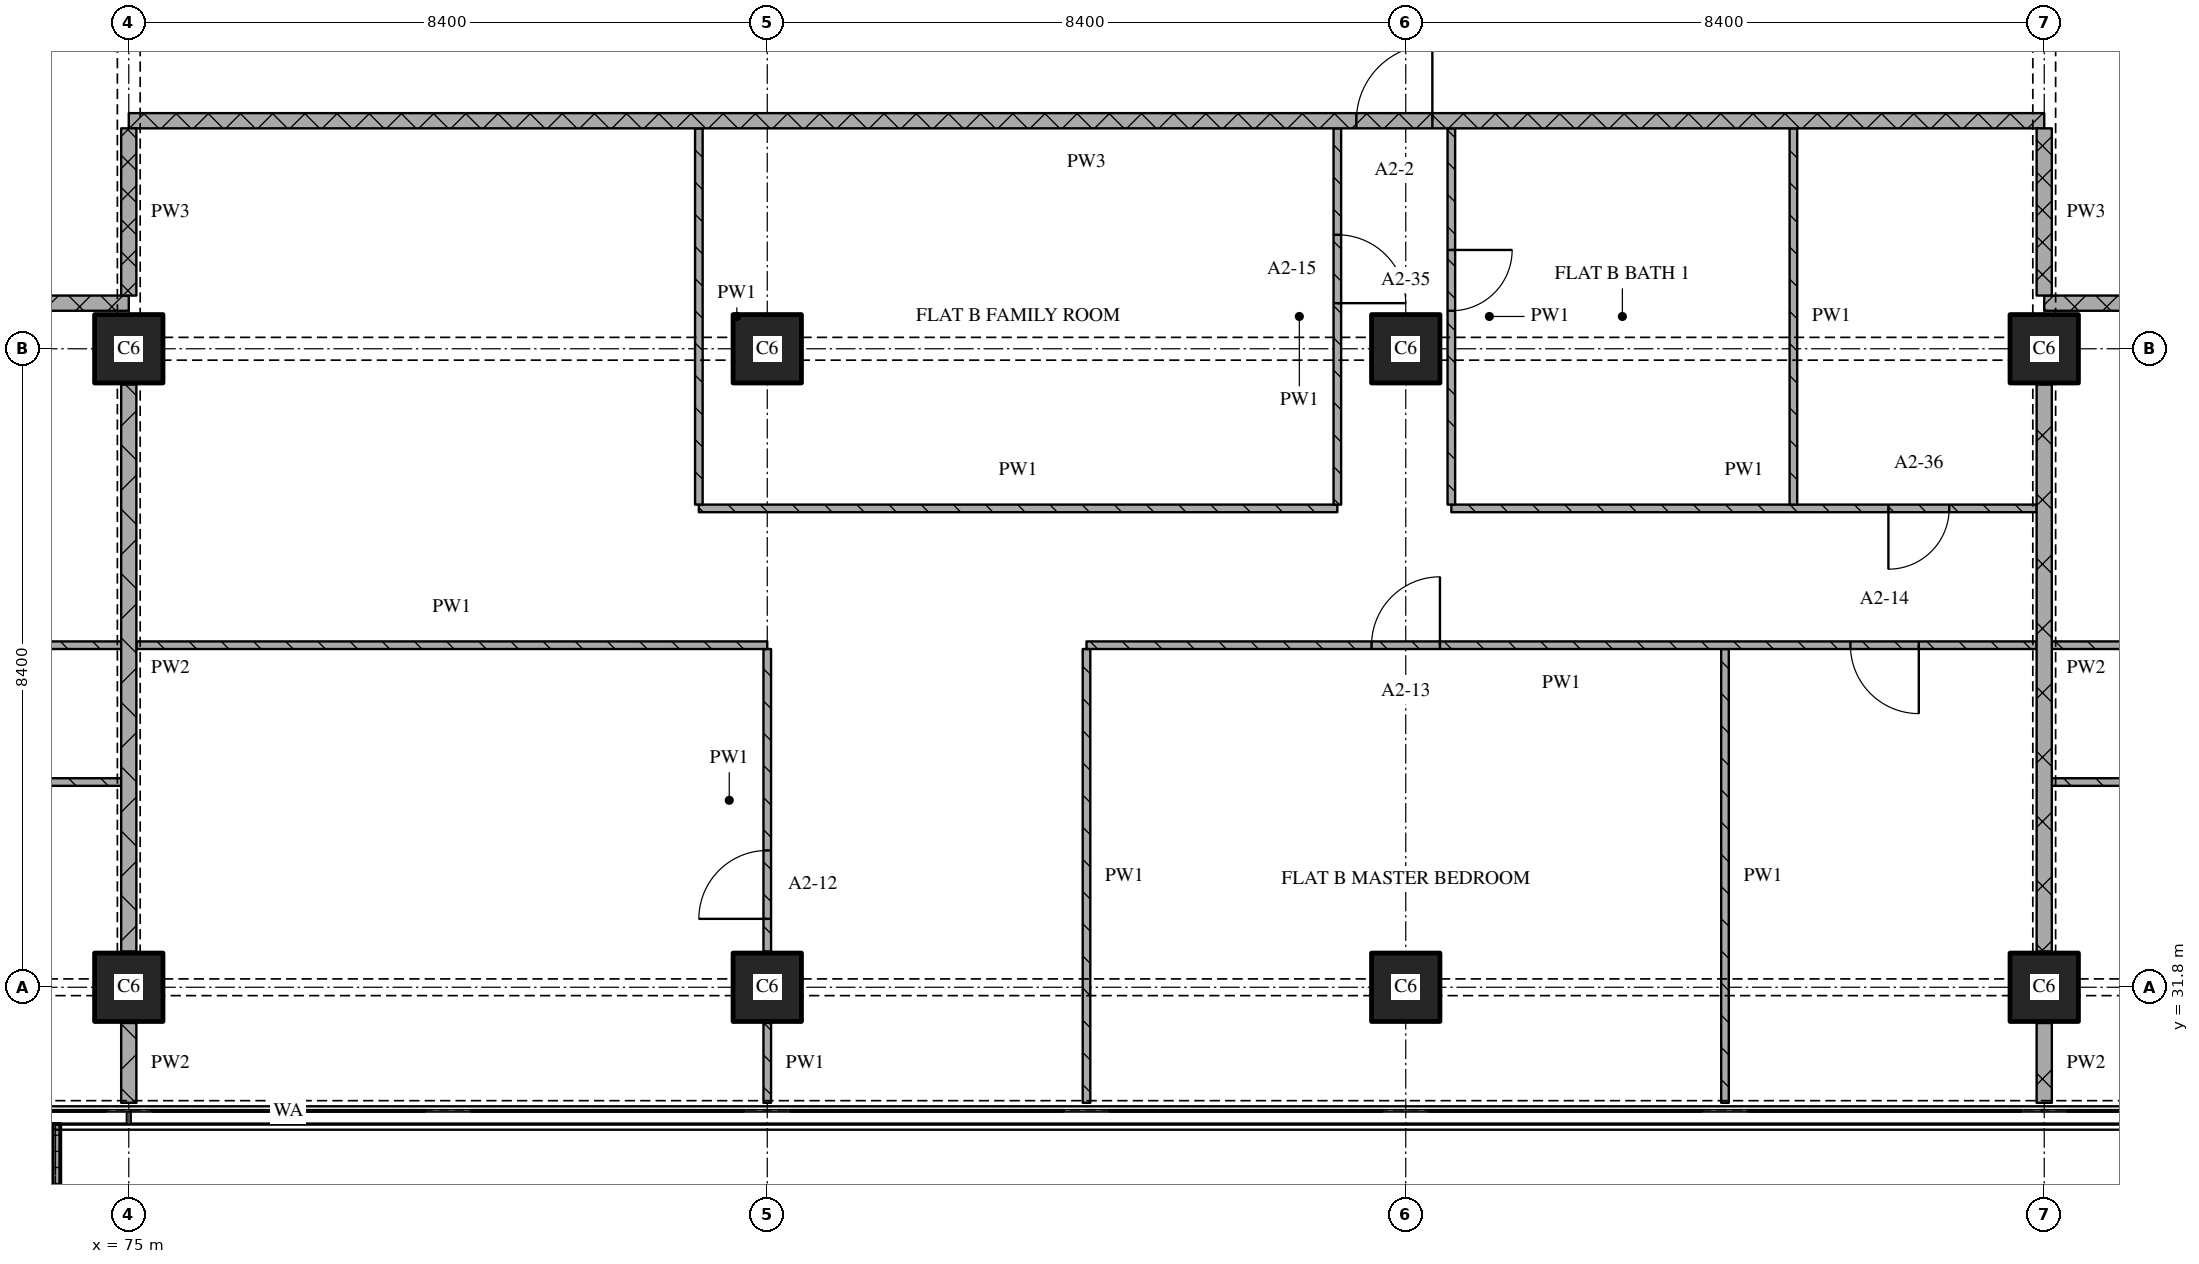
"""IFC4 building model, lengths in metres.
Left out: names, types, materials, properties, quantities, classifications, styles, units other than length and angle.
Written with IfcOpenShell. Run it as: python <this file> out.ifc"""

import sys

from ifc_helpers import new_model, si_unit, direction, frame, frame_2d, origin, origin_2d, place, context, subcontext, project, spatial, polyline, rectangle, outline, extrude, element, fill, save


model = new_model("IFC4")
c1 = context("Model", 3, precision=1e-05, world=origin(), true_north=direction((0.0, 1.0)))
c2 = subcontext(c1, "Body", "Model", "MODEL_VIEW")
j1 = project(units=[si_unit("LENGTHUNIT", "METRE"), si_unit("PLANEANGLEUNIT", "RADIAN")], contexts=[c1])
p1 = place(None, origin())
s1 = spatial("IfcSite", under=j1, at=p1, CompositionType="ELEMENT")
p2 = place(p1, origin())
s2 = spatial("IfcBuilding", under=s1, at=p2, CompositionType="ELEMENT")
p3 = place(p2, frame((0.0, 0.0, 55.2)))
s3 = spatial("IfcBuildingStorey", under=s2, at=p3, CompositionType="ELEMENT", Elevation=55.2)
for number, where, z_axis, x_axis in (
    (1, (75.0, 31.8, 0.0), (0.0, 0.0, 1.0), (1.0, 0.0, 0.0)),
    (2, (75.0, 40.2, 0.0), (0.0, 0.0, 1.0), (1.0, 0.0, 0.0)),
    (3, (83.4, 31.8, 0.0), (0.0, 0.0, 1.0), (1.0, 0.0, 0.0)),
    (4, (83.4, 40.2, 0.0), (0.0, 0.0, 1.0), (1.0, 0.0, 0.0)),
    (5, (91.8, 31.8, 0.0), (0.0, 0.0, 1.0), (1.0, 0.0, 0.0)),
    (6, (91.8, 40.2, 0.0), (0.0, 0.0, 1.0), (1.0, 0.0, 0.0)),
    (7, (100.2, 31.8, 0.0), (0.0, 0.0, 1.0), (1.0, 0.0, 0.0)),
    (8, (100.2, 40.2, 0.0), (0.0, 0.0, 1.0), (1.0, 0.0, 0.0)),
):
    element("IfcColumn", number, at=place(p3, frame(where, z_axis=z_axis, x_axis=x_axis)), inside=s3, PredefinedType="COLUMN", context=c2, shape_type="SweptSolid", body=[
        extrude(rectangle(XDim=0.9, YDim=0.9, at=origin_2d()), origin(), (0.0, 0.0, 1.0), 3.6),
    ])
p4 = place(p3, origin())
e9 = element("IfcWall", 9, at=p4, inside=s3, PredefinedType="SOLIDWALL", context=c2, shape_type="SweptSolid", body=[
    extrude(outline(polyline([(71.7, 30.0), (71.8, 30.0), (71.8, 28.5), (74.0, 28.5), (74.0, 30.0), (74.1, 30.0), (74.1, 28.4), (71.7, 28.4), (71.7, 30.0)])), origin(), (0.0, 0.0, 1.0), 1.0),
])
p5 = place(p3, frame((74.9, 34.5, 0.0), z_axis=(0.0, 0.0, 1.0), x_axis=(-1.0, 0.0, 0.0)))
e10 = element("IfcWall", 10, at=p5, inside=s3, PredefinedType="PARTITIONING", context=c2, shape_type="SweptSolid", body=[
    extrude(rectangle(XDim=16.7, YDim=0.1, at=frame_2d((8.35, 0.0))), origin(), (0.0, 0.0, 1.0), 3.32),
])
p6 = place(p5, frame((3.65, 0.0, 0.0)))
e11 = element("IfcOpeningElement", 11, at=p6, cuts=e10, PredefinedType="OPENING", context=c2, shape_type="SweptSolid", body=[
    extrude(rectangle(XDim=0.9, YDim=2.1, at=frame_2d((0.45, 1.05))), frame((0.0, 0.06, 0.0), z_axis=(0.0, -1.0, 0.0), x_axis=(1.0, 0.0, 0.0)), (0.0, 0.0, 1.0), 0.12),
])
p7 = place(p5, frame((12.05, 0.0, 0.0)))
e12 = element("IfcOpeningElement", 12, at=p7, cuts=e10, PredefinedType="OPENING", context=c2, shape_type="SweptSolid", body=[
    extrude(rectangle(XDim=0.9, YDim=2.1, at=frame_2d((0.45, 1.05))), frame((0.0, 0.06, 0.0), z_axis=(0.0, -1.0, 0.0), x_axis=(1.0, 0.0, 0.0)), (0.0, 0.0, 1.0), 0.12),
])
p8 = place(p3, frame((117.0, 34.5, 0.0), z_axis=(0.0, 0.0, 1.0), x_axis=(-1.0, 0.0, 0.0)))
e13 = element("IfcWall", 13, at=p8, inside=s3, PredefinedType="PARTITIONING", context=c2, shape_type="SweptSolid", body=[
    extrude(rectangle(XDim=16.7, YDim=0.1, at=frame_2d((8.35, 0.0))), origin(), (0.0, 0.0, 1.0), 3.32),
])
p9 = place(p8, frame((7.95, 0.0, 0.0)))
e14 = element("IfcOpeningElement", 14, at=p9, cuts=e13, PredefinedType="OPENING", context=c2, shape_type="SweptSolid", body=[
    extrude(rectangle(XDim=0.9, YDim=2.1, at=frame_2d((0.45, 1.05))), frame((0.0, 0.06, 0.0), z_axis=(0.0, -1.0, 0.0), x_axis=(1.0, 0.0, 0.0)), (0.0, 0.0, 1.0), 0.12),
])
p10 = place(p8, frame((14.25, 0.0, 0.0)))
e15 = element("IfcOpeningElement", 15, at=p10, cuts=e13, PredefinedType="OPENING", context=c2, shape_type="SweptSolid", body=[
    extrude(rectangle(XDim=0.9, YDim=2.1, at=frame_2d((0.45, 1.05))), frame((0.0, 0.06, 0.0), z_axis=(0.0, -1.0, 0.0), x_axis=(1.0, 0.0, 0.0)), (0.0, 0.0, 1.0), 0.12),
])
p11 = place(p3, frame((82.5, 38.1, 0.0), z_axis=(0.0, 0.0, 1.0), x_axis=(1.0, 0.0, 0.0)))
e16 = element("IfcWall", 16, at=p11, inside=s3, PredefinedType="PARTITIONING", context=c2, shape_type="SweptSolid", body=[
    extrude(rectangle(XDim=8.4, YDim=0.1, at=frame_2d((4.2, 0.0))), origin(), (0.0, 0.0, 1.0), 3.32),
])
p12 = place(p3, frame((92.4, 38.1, 0.0), z_axis=(0.0, 0.0, 1.0), x_axis=(1.0, 0.0, 0.0)))
e17 = element("IfcWall", 17, at=p12, inside=s3, PredefinedType="PARTITIONING", context=c2, shape_type="SweptSolid", body=[
    extrude(rectangle(XDim=7.7, YDim=0.1, at=frame_2d((3.85, 0.0))), origin(), (0.0, 0.0, 1.0), 3.32),
])
p13 = place(p12, frame((5.75, 0.0, 0.0)))
e18 = element("IfcOpeningElement", 18, at=p13, cuts=e17, PredefinedType="OPENING", context=c2, shape_type="SweptSolid", body=[
    extrude(rectangle(XDim=0.8, YDim=2.1, at=frame_2d((0.4, 1.05))), frame((0.0, 0.06, 0.0), z_axis=(0.0, -1.0, 0.0), x_axis=(1.0, 0.0, 0.0)), (0.0, 0.0, 1.0), 0.12),
])
p14 = place(p3, frame((75.0, 40.8, 0.0), z_axis=(0.0, 0.0, 1.0), x_axis=(-1.0, 0.0, 0.0)))
e19 = element("IfcWall", 19, at=p14, inside=s3, PredefinedType="PARTITIONING", context=c2, shape_type="SweptSolid", body=[
    extrude(rectangle(XDim=24.08, YDim=0.2, at=frame_2d((12.04, 0.0))), origin(), (0.0, 0.0, 1.0), 3.32),
])
p15 = place(p14, frame((8.95, 0.0, 0.0)))
e20 = element("IfcOpeningElement", 20, at=p15, cuts=e19, PredefinedType="OPENING", context=c2, shape_type="SweptSolid", body=[
    extrude(rectangle(XDim=1.0, YDim=2.1, at=frame_2d((0.5, 1.05))), frame((0.0, 0.11, 0.0), z_axis=(0.0, -1.0, 0.0), x_axis=(1.0, 0.0, 0.0)), (0.0, 0.0, 1.0), 0.22),
])
p16 = place(p3, frame((124.28, 40.8, 0.0), z_axis=(0.0, 0.0, 1.0), x_axis=(-1.0, 0.0, 0.0)))
e21 = element("IfcWall", 21, at=p16, inside=s3, PredefinedType="PARTITIONING", context=c2, shape_type="SweptSolid", body=[
    extrude(rectangle(XDim=24.08, YDim=0.2, at=frame_2d((12.04, 0.0))), origin(), (0.0, 0.0, 1.0), 3.32),
])
p17 = place(p16, frame((12.93, 0.0, 0.0)))
e22 = element("IfcOpeningElement", 22, at=p17, cuts=e21, PredefinedType="OPENING", context=c2, shape_type="SweptSolid", body=[
    extrude(rectangle(XDim=1.0, YDim=2.1, at=frame_2d((0.5, 1.05))), frame((0.0, 0.11, 0.0), z_axis=(0.0, -1.0, 0.0), x_axis=(1.0, 0.0, 0.0)), (0.0, 0.0, 1.0), 0.22),
])
p18 = place(p3, frame((100.2, 43.2, 0.0), z_axis=(0.0, 0.0, 1.0), x_axis=(-1.0, 0.0, 0.0)))
e23 = element("IfcWall", 23, at=p18, inside=s3, PredefinedType="PARTITIONING", context=c2, shape_type="SweptSolid", body=[
    extrude(rectangle(XDim=25.2, YDim=0.2, at=frame_2d((12.6, 0.0))), origin(), (0.0, 0.0, 1.0), 3.32),
])
p19 = place(p18, frame((8.05, 0.0, 0.0)))
e24 = element("IfcOpeningElement", 24, at=p19, cuts=e23, PredefinedType="OPENING", context=c2, shape_type="SweptSolid", body=[
    extrude(rectangle(XDim=1.0, YDim=2.1, at=frame_2d((0.5, 1.05))), frame((0.0, 0.11, 0.0), z_axis=(0.0, -1.0, 0.0), x_axis=(1.0, 0.0, 0.0)), (0.0, 0.0, 1.0), 0.22),
])
p20 = place(p3, frame((75.0, 43.1, 0.0), z_axis=(0.0, 0.0, 1.0), x_axis=(0.0, -1.0, 0.0)))
e25 = element("IfcWall", 25, at=p20, inside=s3, PredefinedType="PARTITIONING", context=c2, shape_type="SweptSolid", body=[
    extrude(rectangle(XDim=2.2, YDim=0.2, at=frame_2d((1.1, 0.0))), origin(), (0.0, 0.0, 1.0), 2.43),
])
p21 = place(p3, frame((75.0, 31.33, 0.0), z_axis=(0.0, 0.0, 1.0), x_axis=(0.0, -1.0, 0.0)))
e26 = element("IfcWall", 26, at=p21, inside=s3, PredefinedType="PARTITIONING", context=c2, shape_type="SweptSolid", body=[
    extrude(rectangle(XDim=1.05, YDim=0.2, at=frame_2d((0.525, 0.0))), origin(), (0.0, 0.0, 1.0), 3.32),
])
p22 = place(p3, frame((75.0, 39.73, 0.0), z_axis=(0.0, 0.0, 1.0), x_axis=(0.0, -1.0, 0.0)))
e27 = element("IfcWall", 27, at=p22, inside=s3, PredefinedType="PARTITIONING", context=c2, shape_type="SweptSolid", body=[
    extrude(rectangle(XDim=7.46, YDim=0.2, at=frame_2d((3.73, 0.0))), origin(), (0.0, 0.0, 1.0), 2.83),
])
p23 = place(p3, frame((82.5, 43.1, 0.0), z_axis=(0.0, 0.0, 1.0), x_axis=(0.0, -1.0, 0.0)))
e28 = element("IfcWall", 28, at=p23, inside=s3, PredefinedType="PARTITIONING", context=c2, shape_type="SweptSolid", body=[
    extrude(rectangle(XDim=4.95, YDim=0.1, at=frame_2d((2.475, 0.0))), origin(), (0.0, 0.0, 1.0), 3.32),
])
p24 = place(p3, frame((83.4, 31.33, 0.0), z_axis=(0.0, 0.0, 1.0), x_axis=(0.0, -1.0, 0.0)))
e29 = element("IfcWall", 29, at=p24, inside=s3, PredefinedType="PARTITIONING", context=c2, shape_type="SweptSolid", body=[
    extrude(rectangle(XDim=1.05, YDim=0.1, at=frame_2d((0.525, 0.0))), origin(), (0.0, 0.0, 1.0), 3.32),
])
p25 = place(p3, frame((83.4, 32.27, 0.0), z_axis=(0.0, 0.0, 1.0), x_axis=(0.0, 1.0, 0.0)))
e30 = element("IfcWall", 30, at=p25, inside=s3, PredefinedType="PARTITIONING", context=c2, shape_type="SweptSolid", body=[
    extrude(rectangle(XDim=3.98, YDim=0.1, at=frame_2d((1.99, 0.0))), origin(), (0.0, 0.0, 1.0), 3.32),
])
p26 = place(p25, frame((0.43, 0.0, 0.0)))
e31 = element("IfcOpeningElement", 31, at=p26, cuts=e30, PredefinedType="OPENING", context=c2, shape_type="SweptSolid", body=[
    extrude(rectangle(XDim=0.9, YDim=2.1, at=frame_2d((0.45, 1.05))), frame((0.0, 0.06, 0.0), z_axis=(0.0, -1.0, 0.0), x_axis=(1.0, 0.0, 0.0)), (0.0, 0.0, 1.0), 0.12),
])
p27 = place(p3, frame((87.6, 36.25, 0.0), z_axis=(0.0, 0.0, 1.0), x_axis=(0.0, -1.0, 0.0)))
e32 = element("IfcWall", 32, at=p27, inside=s3, PredefinedType="PARTITIONING", context=c2, shape_type="SweptSolid", body=[
    extrude(rectangle(XDim=5.97, YDim=0.1, at=frame_2d((2.985, 0.0))), origin(), (0.0, 0.0, 1.0), 3.32),
])
p28 = place(p3, frame((90.9, 38.15, 0.0), z_axis=(0.0, 0.0, 1.0), x_axis=(0.0, 1.0, 0.0)))
e33 = element("IfcWall", 33, at=p28, inside=s3, PredefinedType="PARTITIONING", context=c2, shape_type="SweptSolid", body=[
    extrude(rectangle(XDim=4.95, YDim=0.1, at=frame_2d((2.475, 0.0))), origin(), (0.0, 0.0, 1.0), 3.32),
])
p29 = place(p28, frame((2.65, 0.0, 0.0)))
e34 = element("IfcOpeningElement", 34, at=p29, cuts=e33, PredefinedType="OPENING", context=c2, shape_type="SweptSolid", body=[
    extrude(rectangle(XDim=0.9, YDim=2.1, at=frame_2d((0.45, 1.05))), frame((0.0, 0.06, 0.0), z_axis=(0.0, -1.0, 0.0), x_axis=(1.0, 0.0, 0.0)), (0.0, 0.0, 1.0), 0.12),
])
p30 = place(p3, frame((92.4, 43.1, 0.0), z_axis=(0.0, 0.0, 1.0), x_axis=(0.0, -1.0, 0.0)))
e35 = element("IfcWall", 35, at=p30, inside=s3, PredefinedType="PARTITIONING", context=c2, shape_type="SweptSolid", body=[
    extrude(rectangle(XDim=4.95, YDim=0.1, at=frame_2d((2.475, 0.0))), origin(), (0.0, 0.0, 1.0), 3.32),
])
p31 = place(p30, frame((1.6, 0.0, 0.0)))
e36 = element("IfcOpeningElement", 36, at=p31, cuts=e35, PredefinedType="OPENING", context=c2, shape_type="SweptSolid", body=[
    extrude(rectangle(XDim=0.8, YDim=2.1, at=frame_2d((0.4, 1.05))), frame((0.0, 0.06, 0.0), z_axis=(0.0, -1.0, 0.0), x_axis=(1.0, 0.0, 0.0)), (0.0, 0.0, 1.0), 0.12),
])
p32 = place(p3, frame((96.0, 36.25, 0.0), z_axis=(0.0, 0.0, 1.0), x_axis=(0.0, -1.0, 0.0)))
e37 = element("IfcWall", 37, at=p32, inside=s3, PredefinedType="PARTITIONING", context=c2, shape_type="SweptSolid", body=[
    extrude(rectangle(XDim=5.97, YDim=0.1, at=frame_2d((2.985, 0.0))), origin(), (0.0, 0.0, 1.0), 3.32),
])
p33 = place(p3, frame((96.9, 43.1, 0.0), z_axis=(0.0, 0.0, 1.0), x_axis=(0.0, -1.0, 0.0)))
e38 = element("IfcWall", 38, at=p33, inside=s3, PredefinedType="PARTITIONING", context=c2, shape_type="SweptSolid", body=[
    extrude(rectangle(XDim=4.95, YDim=0.1, at=frame_2d((2.475, 0.0))), origin(), (0.0, 0.0, 1.0), 3.32),
])
p34 = place(p3, frame((100.2, 43.1, 0.0), z_axis=(0.0, 0.0, 1.0), x_axis=(0.0, -1.0, 0.0)))
e39 = element("IfcWall", 39, at=p34, inside=s3, PredefinedType="PARTITIONING", context=c2, shape_type="SweptSolid", body=[
    extrude(rectangle(XDim=2.2, YDim=0.2, at=frame_2d((1.1, 0.0))), origin(), (0.0, 0.0, 1.0), 2.43),
])
p35 = place(p3, frame((100.2, 31.33, 0.0), z_axis=(0.0, 0.0, 1.0), x_axis=(0.0, -1.0, 0.0)))
e40 = element("IfcWall", 40, at=p35, inside=s3, PredefinedType="PARTITIONING", context=c2, shape_type="SweptSolid", body=[
    extrude(rectangle(XDim=1.05, YDim=0.2, at=frame_2d((0.525, 0.0))), origin(), (0.0, 0.0, 1.0), 3.32),
])
p36 = place(p3, frame((100.2, 39.73, 0.0), z_axis=(0.0, 0.0, 1.0), x_axis=(0.0, -1.0, 0.0)))
e41 = element("IfcWall", 41, at=p36, inside=s3, PredefinedType="PARTITIONING", context=c2, shape_type="SweptSolid", body=[
    extrude(rectangle(XDim=7.46, YDim=0.2, at=frame_2d((3.73, 0.0))), origin(), (0.0, 0.0, 1.0), 2.83),
])
p37 = place(p3, frame((66.3, 36.3, 0.0), z_axis=(0.0, 0.0, 1.0), x_axis=(1.0, 0.0, 0.0)))
e42 = element("IfcWall", 42, at=p37, inside=s3, PredefinedType="PARTITIONING", context=c2, shape_type="SweptSolid", body=[
    extrude(rectangle(XDim=8.6, YDim=0.1, at=frame_2d((4.3, 0.0))), origin(), (0.0, 0.0, 1.0), 3.32),
])
p38 = place(p37, frame((6.2, 0.0, 0.0)))
e43 = element("IfcOpeningElement", 43, at=p38, cuts=e42, PredefinedType="OPENING", context=c2, shape_type="SweptSolid", body=[
    extrude(rectangle(XDim=0.8, YDim=2.1, at=frame_2d((0.4, 1.05))), frame((0.0, 0.06, 0.0), z_axis=(0.0, -1.0, 0.0), x_axis=(1.0, 0.0, 0.0)), (0.0, 0.0, 1.0), 0.12),
])
p39 = place(p3, frame((75.1, 36.3, 0.0), z_axis=(0.0, 0.0, 1.0), x_axis=(1.0, 0.0, 0.0)))
e44 = element("IfcWall", 44, at=p39, inside=s3, PredefinedType="PARTITIONING", context=c2, shape_type="SweptSolid", body=[
    extrude(rectangle(XDim=8.3, YDim=0.1, at=frame_2d((4.15, 0.0))), origin(), (0.0, 0.0, 1.0), 3.32),
])
p40 = place(p3, frame((100.1, 36.3, 0.0), z_axis=(0.0, 0.0, 1.0), x_axis=(-1.0, 0.0, 0.0)))
e45 = element("IfcWall", 45, at=p40, inside=s3, PredefinedType="PARTITIONING", context=c2, shape_type="SweptSolid", body=[
    extrude(rectangle(XDim=12.5, YDim=0.1, at=frame_2d((6.25, 0.0))), origin(), (0.0, 0.0, 1.0), 3.32),
])
p41 = place(p40, frame((1.55, 0.0, 0.0)))
e46 = element("IfcOpeningElement", 46, at=p41, cuts=e45, PredefinedType="OPENING", context=c2, shape_type="SweptSolid", body=[
    extrude(rectangle(XDim=0.9, YDim=2.1, at=frame_2d((0.45, 1.05))), frame((0.0, 0.06, 0.0), z_axis=(0.0, -1.0, 0.0), x_axis=(1.0, 0.0, 0.0)), (0.0, 0.0, 1.0), 0.12),
])
p42 = place(p40, frame((7.85, 0.0, 0.0)))
e47 = element("IfcOpeningElement", 47, at=p42, cuts=e45, PredefinedType="OPENING", context=c2, shape_type="SweptSolid", body=[
    extrude(rectangle(XDim=0.9, YDim=2.1, at=frame_2d((0.45, 1.05))), frame((0.0, 0.06, 0.0), z_axis=(0.0, -1.0, 0.0), x_axis=(1.0, 0.0, 0.0)), (0.0, 0.0, 1.0), 0.12),
])
p43 = place(p3, frame((100.3, 36.3, 0.0), z_axis=(0.0, 0.0, 1.0), x_axis=(1.0, 0.0, 0.0)))
e48 = element("IfcWall", 48, at=p43, inside=s3, PredefinedType="PARTITIONING", context=c2, shape_type="SweptSolid", body=[
    extrude(rectangle(XDim=9.8, YDim=0.1, at=frame_2d((4.9, 0.0))), origin(), (0.0, 0.0, 1.0), 3.32),
])
p44 = place(p43, frame((1.75, 0.0, 0.0)))
e49 = element("IfcOpeningElement", 49, at=p44, cuts=e48, PredefinedType="OPENING", context=c2, shape_type="SweptSolid", body=[
    extrude(rectangle(XDim=0.8, YDim=2.1, at=frame_2d((0.4, 1.05))), frame((0.0, 0.06, 0.0), z_axis=(0.0, -1.0, 0.0), x_axis=(1.0, 0.0, 0.0)), (0.0, 0.0, 1.0), 0.12),
])
p45 = place(p13, origin())
e50 = element("IfcDoor", 50, at=p45, inside=s3, OperationType="SINGLE_SWING_RIGHT", PredefinedType="DOOR", context=c2, shape_type="SweptSolid", body=[
    extrude(rectangle(XDim=0.8, YDim=2.1, at=frame_2d((0.4, 1.05))), frame((0.0, 0.025, 0.0), z_axis=(0.0, -1.0, 0.0), x_axis=(1.0, 0.0, 0.0)), (0.0, 0.0, 1.0), 0.05),
])
fill(e18, e50)
p46 = place(p19, origin())
e51 = element("IfcDoor", 51, at=p46, inside=s3, OperationType="SINGLE_SWING_RIGHT", PredefinedType="DOOR", context=c2, shape_type="SweptSolid", body=[
    extrude(rectangle(XDim=1.0, YDim=2.1, at=frame_2d((0.5, 1.05))), frame((0.0, 0.025, 0.0), z_axis=(0.0, -1.0, 0.0), x_axis=(1.0, 0.0, 0.0)), (0.0, 0.0, 1.0), 0.05),
])
fill(e24, e51)
p47 = place(p26, origin())
e52 = element("IfcDoor", 52, at=p47, inside=s3, OperationType="SINGLE_SWING_LEFT", PredefinedType="DOOR", context=c2, shape_type="SweptSolid", body=[
    extrude(rectangle(XDim=0.9, YDim=2.1, at=frame_2d((0.45, 1.05))), frame((0.0, 0.025, 0.0), z_axis=(0.0, -1.0, 0.0), x_axis=(1.0, 0.0, 0.0)), (0.0, 0.0, 1.0), 0.05),
])
fill(e31, e52)
p48 = place(p29, origin())
e53 = element("IfcDoor", 53, at=p48, inside=s3, OperationType="SINGLE_SWING_RIGHT", PredefinedType="DOOR", context=c2, shape_type="SweptSolid", body=[
    extrude(rectangle(XDim=0.9, YDim=2.1, at=frame_2d((0.45, 1.05))), frame((0.0, 0.025, 0.0), z_axis=(0.0, -1.0, 0.0), x_axis=(1.0, 0.0, 0.0)), (0.0, 0.0, 1.0), 0.05),
])
fill(e34, e53)
p49 = place(p31, origin())
e54 = element("IfcDoor", 54, at=p49, inside=s3, OperationType="SINGLE_SWING_LEFT", PredefinedType="DOOR", context=c2, shape_type="SweptSolid", body=[
    extrude(rectangle(XDim=0.8, YDim=2.1, at=frame_2d((0.4, 1.05))), frame((0.0, 0.025, 0.0), z_axis=(0.0, -1.0, 0.0), x_axis=(1.0, 0.0, 0.0)), (0.0, 0.0, 1.0), 0.05),
])
fill(e36, e54)
p50 = place(p41, origin())
e55 = element("IfcDoor", 55, at=p50, inside=s3, OperationType="SINGLE_SWING_LEFT", PredefinedType="DOOR", context=c2, shape_type="SweptSolid", body=[
    extrude(rectangle(XDim=0.9, YDim=2.1, at=frame_2d((0.45, 1.05))), frame((0.0, 0.025, 0.0), z_axis=(0.0, -1.0, 0.0), x_axis=(1.0, 0.0, 0.0)), (0.0, 0.0, 1.0), 0.05),
])
fill(e46, e55)
p51 = place(p42, origin())
e56 = element("IfcDoor", 56, at=p51, inside=s3, OperationType="SINGLE_SWING_RIGHT", PredefinedType="DOOR", context=c2, shape_type="SweptSolid", body=[
    extrude(rectangle(XDim=0.9, YDim=2.1, at=frame_2d((0.45, 1.05))), frame((0.0, 0.025, 0.0), z_axis=(0.0, -1.0, 0.0), x_axis=(1.0, 0.0, 0.0)), (0.0, 0.0, 1.0), 0.05),
])
fill(e47, e56)
save(model, sys.argv[1])
